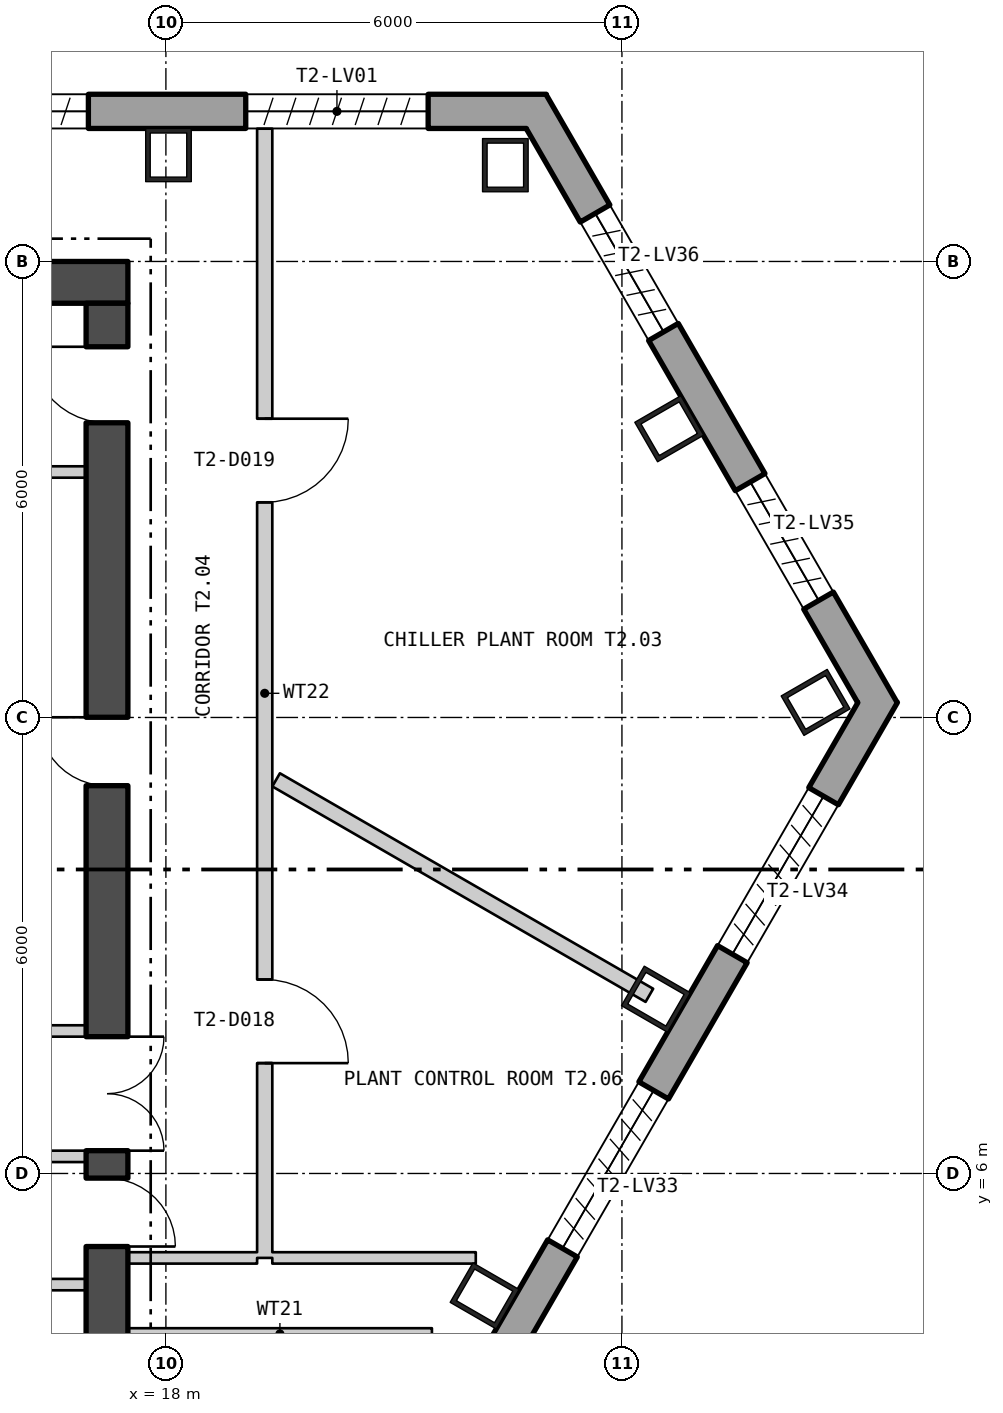
"""IFC4 building model, lengths in metres.
Left out: names, types, materials, properties, quantities, classifications, styles, units other than length and angle.
Written with IfcOpenShell. Run it as: python <this file> out.ifc"""

import sys

from ifc_helpers import new_model, si_unit, direction, frame, frame_2d, origin, origin_2d, place, context, subcontext, project, spatial, polyline, rectangle, hollow_rectangle, outline, extrude, element, fill, save


model = new_model("IFC4")
c1 = context("Model", 3, precision=1e-05, world=origin(), true_north=direction((0.0, 1.0)))
c2 = subcontext(c1, "Body", "Model", "MODEL_VIEW")
j1 = project(units=[si_unit("LENGTHUNIT", "METRE"), si_unit("PLANEANGLEUNIT", "RADIAN")], contexts=[c1])
p1 = place(None, origin())
s1 = spatial("IfcSite", under=j1, at=p1, CompositionType="ELEMENT")
p2 = place(p1, origin())
s2 = spatial("IfcBuilding", under=s1, at=p2, CompositionType="ELEMENT")
p3 = place(p2, frame((0.0, 0.0, 133.8)))
s3 = spatial("IfcBuildingStorey", under=s2, at=p3, CompositionType="ELEMENT", Elevation=133.8)
for number, where, z_axis, x_axis in (
    (1, (22.466, 19.267, 0.0), (0.0, 0.0, 1.0), (-1.0, 0.0, 0.0)),
    (2, (18.034, 19.4, 0.0), (0.0, 0.0, 1.0), (-1.0, 0.0, 0.0)),
    (3, (22.193, 4.389, 0.0), (0.0, 0.0, 1.0), (0.5, 0.866, 0.0)),
    (4, (24.447, 8.293, 0.0), (0.0, 0.0, 1.0), (0.5, 0.866, 0.0)),
    (5, (26.548, 12.198, 0.0), (0.0, 0.0, 1.0), (-0.5, 0.866, 0.0)),
    (6, (24.622, 15.799, 0.0), (0.0, 0.0, 1.0), (-0.5, 0.866, 0.0)),
):
    element("IfcColumn", number, at=place(p3, frame(where, z_axis=z_axis, x_axis=x_axis)), inside=s3, PredefinedType="COLUMN", context=c2, shape_type="SweptSolid", body=[
        extrude(hollow_rectangle(XDim=0.6, YDim=0.7, WallThickness=0.06, at=origin_2d()), origin(), (0.0, 0.0, 1.0), 6.0),
    ])
p4 = place(p3, frame((22.875, 19.975, -0.4), z_axis=(0.0, 0.0, 1.0), x_axis=(-1.0, 0.0, 0.0)))
e7 = element("IfcWall", 7, at=p4, inside=s3, PredefinedType="SOLIDWALL", context=c2, shape_type="SweptSolid", body=[
    extrude(outline(polyline([(-0.13, -0.225), (45.88, -0.225), (45.62, 0.225), (0.13, 0.225), (-0.13, -0.225)])), origin(), (0.0, 0.0, 1.0), 6.0),
])
p5 = place(p4, frame((1.425, 0.0, 1.6)))
e8 = element("IfcOpeningElement", 8, at=p5, cuts=e7, PredefinedType="OPENING", context=c2, shape_type="SweptSolid", body=[
    extrude(rectangle(XDim=2.4, YDim=3.6, at=frame_2d((1.2, 1.8))), frame((0.0, 0.235, 0.0), z_axis=(0.0, -1.0, 0.0), x_axis=(1.0, 0.0, 0.0)), (0.0, 0.0, 1.0), 0.47),
])
p6 = place(p4, frame((5.895, 0.0, 1.6)))
e9 = element("IfcOpeningElement", 9, at=p6, cuts=e7, PredefinedType="OPENING", context=c2, shape_type="SweptSolid", body=[
    extrude(rectangle(XDim=2.4, YDim=3.6, at=frame_2d((1.2, 1.8))), frame((0.0, 0.235, 0.0), z_axis=(0.0, -1.0, 0.0), x_axis=(1.0, 0.0, 0.0)), (0.0, 0.0, 1.0), 0.47),
])
p7 = place(p4, frame((10.403, 0.0, 1.6)))
e10 = element("IfcOpeningElement", 10, at=p7, cuts=e7, PredefinedType="OPENING", context=c2, shape_type="SweptSolid", body=[
    extrude(rectangle(XDim=2.4, YDim=3.6, at=frame_2d((1.2, 1.8))), frame((0.0, 0.235, 0.0), z_axis=(0.0, -1.0, 0.0), x_axis=(1.0, 0.0, 0.0)), (0.0, 0.0, 1.0), 0.47),
])
p8 = place(p4, frame((14.912, 0.0, 1.6)))
e11 = element("IfcOpeningElement", 11, at=p8, cuts=e7, PredefinedType="OPENING", context=c2, shape_type="SweptSolid", body=[
    extrude(rectangle(XDim=2.4, YDim=3.6, at=frame_2d((1.2, 1.8))), frame((0.0, 0.235, 0.0), z_axis=(0.0, -1.0, 0.0), x_axis=(1.0, 0.0, 0.0)), (0.0, 0.0, 1.0), 0.47),
])
p9 = place(p4, frame((19.421, 0.0, 1.6)))
e12 = element("IfcOpeningElement", 12, at=p9, cuts=e7, PredefinedType="OPENING", context=c2, shape_type="SweptSolid", body=[
    extrude(rectangle(XDim=2.4, YDim=3.6, at=frame_2d((1.2, 1.8))), frame((0.0, 0.235, 0.0), z_axis=(0.0, -1.0, 0.0), x_axis=(1.0, 0.0, 0.0)), (0.0, 0.0, 1.0), 0.47),
])
p10 = place(p4, frame((23.929, 0.0, 1.6)))
e13 = element("IfcOpeningElement", 13, at=p10, cuts=e7, PredefinedType="OPENING", context=c2, shape_type="SweptSolid", body=[
    extrude(rectangle(XDim=2.4, YDim=3.6, at=frame_2d((1.2, 1.8))), frame((0.0, 0.235, 0.0), z_axis=(0.0, -1.0, 0.0), x_axis=(1.0, 0.0, 0.0)), (0.0, 0.0, 1.0), 0.47),
])
p11 = place(p4, frame((28.438, 0.0, 1.6)))
e14 = element("IfcOpeningElement", 14, at=p11, cuts=e7, PredefinedType="OPENING", context=c2, shape_type="SweptSolid", body=[
    extrude(rectangle(XDim=2.4, YDim=3.6, at=frame_2d((1.2, 1.8))), frame((0.0, 0.235, 0.0), z_axis=(0.0, -1.0, 0.0), x_axis=(1.0, 0.0, 0.0)), (0.0, 0.0, 1.0), 0.47),
])
p12 = place(p4, frame((32.947, 0.0, 1.6)))
e15 = element("IfcOpeningElement", 15, at=p12, cuts=e7, PredefinedType="OPENING", context=c2, shape_type="SweptSolid", body=[
    extrude(rectangle(XDim=2.4, YDim=3.6, at=frame_2d((1.2, 1.8))), frame((0.0, 0.235, 0.0), z_axis=(0.0, -1.0, 0.0), x_axis=(1.0, 0.0, 0.0)), (0.0, 0.0, 1.0), 0.47),
])
p13 = place(p4, frame((37.455, 0.0, 1.6)))
e16 = element("IfcOpeningElement", 16, at=p13, cuts=e7, PredefinedType="OPENING", context=c2, shape_type="SweptSolid", body=[
    extrude(rectangle(XDim=2.4, YDim=3.6, at=frame_2d((1.2, 1.8))), frame((0.0, 0.235, 0.0), z_axis=(0.0, -1.0, 0.0), x_axis=(1.0, 0.0, 0.0)), (0.0, 0.0, 1.0), 0.47),
])
p14 = place(p4, frame((41.925, 0.0, 1.6)))
e17 = element("IfcOpeningElement", 17, at=p14, cuts=e7, PredefinedType="OPENING", context=c2, shape_type="SweptSolid", body=[
    extrude(rectangle(XDim=2.4, YDim=3.6, at=frame_2d((1.2, 1.8))), frame((0.0, 0.235, 0.0), z_axis=(0.0, -1.0, 0.0), x_axis=(1.0, 0.0, 0.0)), (0.0, 0.0, 1.0), 0.47),
])
p15 = place(p3, frame((4.49, -27.423, -0.18), z_axis=(0.0, 0.0, 1.0), x_axis=(0.500000335318, 0.866025210188, 0.0)))
e18 = element("IfcWall", 18, at=p15, inside=s3, PredefinedType="SOLIDWALL", context=c2, shape_type="SweptSolid", body=[
    extrude(outline(polyline([(-0.13, -0.225), (45.88, -0.225), (45.62, 0.225), (0.13, 0.225), (-0.13, -0.225)])), origin(), (0.0, 0.0, 1.0), 6.0),
])
p16 = place(p15, frame((1.425, 0.0, 1.38)))
e19 = element("IfcOpeningElement", 19, at=p16, cuts=e18, PredefinedType="OPENING", context=c2, shape_type="SweptSolid", body=[
    extrude(rectangle(XDim=2.4, YDim=3.6, at=frame_2d((1.2, 1.8))), frame((0.0, 0.235, 0.0), z_axis=(0.0, -1.0, 0.0), x_axis=(1.0, 0.0, 0.0)), (0.0, 0.0, 1.0), 0.47),
])
p17 = place(p15, frame((5.895, 0.0, 1.38)))
e20 = element("IfcOpeningElement", 20, at=p17, cuts=e18, PredefinedType="OPENING", context=c2, shape_type="SweptSolid", body=[
    extrude(rectangle(XDim=2.4, YDim=3.6, at=frame_2d((1.2, 1.8))), frame((0.0, 0.235, 0.0), z_axis=(0.0, -1.0, 0.0), x_axis=(1.0, 0.0, 0.0)), (0.0, 0.0, 1.0), 0.47),
])
p18 = place(p15, frame((10.403, 0.0, 1.38)))
e21 = element("IfcOpeningElement", 21, at=p18, cuts=e18, PredefinedType="OPENING", context=c2, shape_type="SweptSolid", body=[
    extrude(rectangle(XDim=2.4, YDim=3.6, at=frame_2d((1.2, 1.8))), frame((0.0, 0.235, 0.0), z_axis=(0.0, -1.0, 0.0), x_axis=(1.0, 0.0, 0.0)), (0.0, 0.0, 1.0), 0.47),
])
p19 = place(p15, frame((14.912, 0.0, 1.38)))
e22 = element("IfcOpeningElement", 22, at=p19, cuts=e18, PredefinedType="OPENING", context=c2, shape_type="SweptSolid", body=[
    extrude(rectangle(XDim=2.4, YDim=3.6, at=frame_2d((1.2, 1.8))), frame((0.0, 0.235, 0.0), z_axis=(0.0, -1.0, 0.0), x_axis=(1.0, 0.0, 0.0)), (0.0, 0.0, 1.0), 0.47),
])
p20 = place(p15, frame((19.421, 0.0, 1.38)))
e23 = element("IfcOpeningElement", 23, at=p20, cuts=e18, PredefinedType="OPENING", context=c2, shape_type="SweptSolid", body=[
    extrude(rectangle(XDim=2.4, YDim=3.6, at=frame_2d((1.2, 1.8))), frame((0.0, 0.235, 0.0), z_axis=(0.0, -1.0, 0.0), x_axis=(1.0, 0.0, 0.0)), (0.0, 0.0, 1.0), 0.47),
])
p21 = place(p15, frame((23.929, 0.0, 1.38)))
e24 = element("IfcOpeningElement", 24, at=p21, cuts=e18, PredefinedType="OPENING", context=c2, shape_type="SweptSolid", body=[
    extrude(rectangle(XDim=2.4, YDim=3.6, at=frame_2d((1.2, 1.8))), frame((0.0, 0.235, 0.0), z_axis=(0.0, -1.0, 0.0), x_axis=(1.0, 0.0, 0.0)), (0.0, 0.0, 1.0), 0.47),
])
p22 = place(p15, frame((28.438, 0.0, 1.38)))
e25 = element("IfcOpeningElement", 25, at=p22, cuts=e18, PredefinedType="OPENING", context=c2, shape_type="SweptSolid", body=[
    extrude(rectangle(XDim=2.4, YDim=3.6, at=frame_2d((1.2, 1.8))), frame((0.0, 0.235, 0.0), z_axis=(0.0, -1.0, 0.0), x_axis=(1.0, 0.0, 0.0)), (0.0, 0.0, 1.0), 0.47),
])
p23 = place(p15, frame((32.947, 0.0, 1.38)))
e26 = element("IfcOpeningElement", 26, at=p23, cuts=e18, PredefinedType="OPENING", context=c2, shape_type="SweptSolid", body=[
    extrude(rectangle(XDim=2.4, YDim=3.6, at=frame_2d((1.2, 1.8))), frame((0.0, 0.235, 0.0), z_axis=(0.0, -1.0, 0.0), x_axis=(1.0, 0.0, 0.0)), (0.0, 0.0, 1.0), 0.47),
])
p24 = place(p15, frame((37.455, 0.0, 1.38)))
e27 = element("IfcOpeningElement", 27, at=p24, cuts=e18, PredefinedType="OPENING", context=c2, shape_type="SweptSolid", body=[
    extrude(rectangle(XDim=2.4, YDim=3.6, at=frame_2d((1.2, 1.8))), frame((0.0, 0.235, 0.0), z_axis=(0.0, -1.0, 0.0), x_axis=(1.0, 0.0, 0.0)), (0.0, 0.0, 1.0), 0.47),
])
p25 = place(p15, frame((41.925, 0.0, 1.38)))
e28 = element("IfcOpeningElement", 28, at=p25, cuts=e18, PredefinedType="OPENING", context=c2, shape_type="SweptSolid", body=[
    extrude(rectangle(XDim=2.4, YDim=3.6, at=frame_2d((1.2, 1.8))), frame((0.0, 0.235, 0.0), z_axis=(0.0, -1.0, 0.0), x_axis=(1.0, 0.0, 0.0)), (0.0, 0.0, 1.0), 0.47),
])
p26 = place(p3, frame((27.361, 12.196, -0.4), z_axis=(0.0, 0.0, 1.0), x_axis=(-0.500003921696, 0.86602313958, 0.0)))
e29 = element("IfcWall", 29, at=p26, inside=s3, PredefinedType="SOLIDWALL", context=c2, shape_type="SweptSolid", body=[
    extrude(outline(polyline([(-0.13, -0.225), (9.11, -0.225), (8.85, 0.225), (0.13, 0.225), (-0.13, -0.225)])), origin(), (0.0, 0.0, 1.0), 6.0),
])
p27 = place(p26, frame((1.549, 0.0, 1.6)))
e30 = element("IfcOpeningElement", 30, at=p27, cuts=e29, PredefinedType="OPENING", context=c2, shape_type="SweptSolid", body=[
    extrude(rectangle(XDim=1.8, YDim=3.6, at=frame_2d((0.9, 1.8))), frame((0.0, 0.235, 0.0), z_axis=(0.0, -1.0, 0.0), x_axis=(1.0, 0.0, 0.0)), (0.0, 0.0, 1.0), 0.47),
])
p28 = place(p26, frame((5.631, 0.0, 1.6)))
e31 = element("IfcOpeningElement", 31, at=p28, cuts=e29, PredefinedType="OPENING", context=c2, shape_type="SweptSolid", body=[
    extrude(rectangle(XDim=1.8, YDim=3.6, at=frame_2d((0.9, 1.8))), frame((0.0, 0.235, 0.0), z_axis=(0.0, -1.0, 0.0), x_axis=(1.0, 0.0, 0.0)), (0.0, 0.0, 1.0), 0.47),
])
p29 = place(p3, frame((-17.5, 17.725, 0.0), z_axis=(0.0, 0.0, 1.0), x_axis=(1.0, 0.0, 0.0)))
e32 = element("IfcWall", 32, at=p29, inside=s3, PredefinedType="SHEAR", context=c2, shape_type="SweptSolid", body=[
    extrude(rectangle(XDim=35.0, YDim=0.55, at=frame_2d((17.5, 0.0))), origin(), (0.0, 0.0, 1.0), 5.8),
])
p30 = place(p3, frame((17.225, 0.55, 0.0), z_axis=(0.0, 0.0, 1.0), x_axis=(0.0, 1.0, 0.0)))
e33 = element("IfcWall", 33, at=p30, inside=s3, PredefinedType="SHEAR", context=c2, shape_type="SweptSolid", body=[
    extrude(rectangle(XDim=16.9, YDim=0.55, at=frame_2d((8.45, 0.0))), origin(), (0.0, 0.0, 1.0), 5.8),
])
p31 = place(p30, frame((5.75, 0.0, 0.0)))
e34 = element("IfcOpeningElement", 34, at=p31, cuts=e33, PredefinedType="OPENING", context=c2, shape_type="SweptSolid", body=[
    extrude(rectangle(XDim=1.5, YDim=2.1, at=frame_2d((0.75, 1.05))), frame((0.0, 0.285, 0.0), z_axis=(0.0, -1.0, 0.0), x_axis=(1.0, 0.0, 0.0)), (0.0, 0.0, 1.0), 0.57),
])
p32 = place(p30, frame((1.506, 0.0, 0.0)))
e35 = element("IfcOpeningElement", 35, at=p32, cuts=e33, PredefinedType="OPENING", context=c2, shape_type="SweptSolid", body=[
    extrude(rectangle(XDim=0.9, YDim=2.1, at=frame_2d((0.45, 1.05))), frame((0.0, 0.285, 0.0), z_axis=(0.0, -1.0, 0.0), x_axis=(1.0, 0.0, 0.0)), (0.0, 0.0, 1.0), 0.57),
])
p33 = place(p30, frame((4.489, 0.0, 0.0)))
e36 = element("IfcOpeningElement", 36, at=p33, cuts=e33, PredefinedType="OPENING", context=c2, shape_type="SweptSolid", body=[
    extrude(rectangle(XDim=0.9, YDim=2.1, at=frame_2d((0.45, 1.05))), frame((0.0, 0.285, 0.0), z_axis=(0.0, -1.0, 0.0), x_axis=(1.0, 0.0, 0.0)), (0.0, 0.0, 1.0), 0.57),
])
p34 = place(p30, frame((10.553, 0.0, 0.0)))
e37 = element("IfcOpeningElement", 37, at=p34, cuts=e33, PredefinedType="OPENING", context=c2, shape_type="SweptSolid", body=[
    extrude(rectangle(XDim=0.9, YDim=2.1, at=frame_2d((0.45, 1.05))), frame((0.0, 0.285, 0.0), z_axis=(0.0, -1.0, 0.0), x_axis=(1.0, 0.0, 0.0)), (0.0, 0.0, 1.0), 0.57),
])
p35 = place(p30, frame((15.328, 0.0, 0.0)))
e38 = element("IfcOpeningElement", 38, at=p35, cuts=e33, PredefinedType="OPENING", context=c2, shape_type="SweptSolid", body=[
    extrude(rectangle(XDim=1.0, YDim=2.1, at=frame_2d((0.5, 1.05))), frame((0.0, 0.285, 0.0), z_axis=(0.0, -1.0, 0.0), x_axis=(1.0, 0.0, 0.0)), (0.0, 0.0, 1.0), 0.57),
])
p36 = place(p3, frame((14.5, 6.225, 0.0), z_axis=(0.0, 0.0, 1.0), x_axis=(1.0, 0.0, 0.0)))
e39 = element("IfcWall", 39, at=p36, inside=s3, PredefinedType="PARTITIONING", context=c2, shape_type="SweptSolid", body=[
    extrude(rectangle(XDim=2.45, YDim=0.15, at=frame_2d((1.225, 0.0))), origin(), (0.0, 0.0, 1.0), 5.8),
])
p37 = place(p3, frame((14.5, 7.875, 0.0), z_axis=(0.0, 0.0, 1.0), x_axis=(1.0, 0.0, 0.0)))
e40 = element("IfcWall", 40, at=p37, inside=s3, PredefinedType="PARTITIONING", context=c2, shape_type="SweptSolid", body=[
    extrude(rectangle(XDim=2.45, YDim=0.15, at=frame_2d((1.225, 0.0))), origin(), (0.0, 0.0, 1.0), 5.5),
])
for number, where, z_axis, x_axis in (
    (41, (14.5, 4.538, 0.0), (0.0, 0.0, 1.0), (1.0, 0.0, 0.0)),
    (42, (14.5, 15.23, 0.0), (0.0, 0.0, 1.0), (1.0, 0.0, 0.0)),
):
    element("IfcWall", number, at=place(p3, frame(where, z_axis=z_axis, x_axis=x_axis)), inside=s3, PredefinedType="PARTITIONING", context=c2, shape_type="SweptSolid", body=[
        extrude(rectangle(XDim=2.45, YDim=0.15, at=frame_2d((1.225, 0.0))), origin(), (0.0, 0.0, 1.0), 5.8),
    ])
p38 = place(p3, frame((17.5, 3.889, 0.0), z_axis=(0.0, 0.0, 1.0), x_axis=(1.0, 0.0, 0.0)))
e43 = element("IfcWall", 43, at=p38, inside=s3, PredefinedType="PARTITIONING", context=c2, shape_type="SweptSolid", body=[
    extrude(rectangle(XDim=4.0, YDim=0.15, at=frame_2d((2.0, 0.0))), origin(), (0.0, 0.0, 1.0), 5.8),
])
p39 = place(p3, frame((17.5, 4.889, 0.0), z_axis=(0.0, 0.0, 1.0), x_axis=(1.0, 0.0, 0.0)))
e44 = element("IfcWall", 44, at=p39, inside=s3, PredefinedType="PARTITIONING", context=c2, shape_type="SweptSolid", body=[
    extrude(rectangle(XDim=1.7, YDim=0.15, at=frame_2d((0.85, 0.0))), origin(), (0.0, 0.0, 1.0), 5.8),
])
p40 = place(p3, frame((19.3, 4.889, 0.0), z_axis=(0.0, 0.0, 1.0), x_axis=(0.0, 1.0, 0.0)))
e45 = element("IfcWall", 45, at=p40, inside=s3, PredefinedType="PARTITIONING", context=c2, shape_type="SweptSolid", body=[
    extrude(rectangle(XDim=14.858, YDim=0.2, at=frame_2d((7.429, 0.0))), origin(), (0.0, 0.0, 1.0), 5.8),
])
p41 = place(p40, frame((2.563, 0.0, 0.0)))
e46 = element("IfcOpeningElement", 46, at=p41, cuts=e45, PredefinedType="OPENING", context=c2, shape_type="SweptSolid", body=[
    extrude(rectangle(XDim=1.1, YDim=2.1, at=frame_2d((0.55, 1.05))), frame((0.0, 0.11, 0.0), z_axis=(0.0, -1.0, 0.0), x_axis=(1.0, 0.0, 0.0)), (0.0, 0.0, 1.0), 0.22),
])
p42 = place(p40, frame((9.942, 0.0, 0.0)))
e47 = element("IfcOpeningElement", 47, at=p42, cuts=e45, PredefinedType="OPENING", context=c2, shape_type="SweptSolid", body=[
    extrude(rectangle(XDim=1.1, YDim=2.1, at=frame_2d((0.55, 1.05))), frame((0.0, 0.11, 0.0), z_axis=(0.0, -1.0, 0.0), x_axis=(1.0, 0.0, 0.0)), (0.0, 0.0, 1.0), 0.22),
])
p43 = place(p3, frame((19.4, 4.889, 0.0), z_axis=(0.0, 0.0, 1.0), x_axis=(1.0, 0.0, 0.0)))
e48 = element("IfcWall", 48, at=p43, inside=s3, PredefinedType="PARTITIONING", context=c2, shape_type="SweptSolid", body=[
    extrude(rectangle(XDim=2.677, YDim=0.15, at=frame_2d((1.339, 0.0))), origin(), (0.0, 0.0, 1.0), 5.8),
])
p44 = place(p3, frame((19.45, 11.179, 0.0), z_axis=(0.0, 0.0, 1.0), x_axis=(0.866053440288, -0.499951436208, 0.0)))
e49 = element("IfcWall", 49, at=p44, inside=s3, PredefinedType="PARTITIONING", context=c2, shape_type="SweptSolid", body=[
    extrude(rectangle(XDim=5.671, YDim=0.2, at=frame_2d((2.835, 0.0))), origin(), (0.0, 0.0, 1.0), 5.8),
])
p45 = place(p31, origin())
e50 = element("IfcDoor", 50, at=p45, inside=s3, OperationType="DOUBLE_DOOR_SINGLE_SWING", PredefinedType="DOOR", context=c2, shape_type="SweptSolid", body=[
    extrude(rectangle(XDim=1.5, YDim=2.1, at=frame_2d((0.75, 1.05))), frame((0.0, 0.025, 0.0), z_axis=(0.0, -1.0, 0.0), x_axis=(1.0, 0.0, 0.0)), (0.0, 0.0, 1.0), 0.05),
])
fill(e34, e50)
p46 = place(p33, origin())
e51 = element("IfcDoor", 51, at=p46, inside=s3, OperationType="SINGLE_SWING_LEFT", PredefinedType="DOOR", context=c2, shape_type="SweptSolid", body=[
    extrude(rectangle(XDim=0.9, YDim=2.1, at=frame_2d((0.45, 1.05))), frame((0.0, 0.025, 0.0), z_axis=(0.0, -1.0, 0.0), x_axis=(1.0, 0.0, 0.0)), (0.0, 0.0, 1.0), 0.05),
])
fill(e36, e51)
p47 = place(p34, origin())
e52 = element("IfcDoor", 52, at=p47, inside=s3, OperationType="SINGLE_SWING_LEFT", PredefinedType="DOOR", context=c2, shape_type="SweptSolid", body=[
    extrude(rectangle(XDim=0.9, YDim=2.1, at=frame_2d((0.45, 1.05))), frame((0.0, 0.025, 0.0), z_axis=(0.0, -1.0, 0.0), x_axis=(1.0, 0.0, 0.0)), (0.0, 0.0, 1.0), 0.05),
])
fill(e37, e52)
p48 = place(p35, origin())
e53 = element("IfcDoor", 53, at=p48, inside=s3, OperationType="SINGLE_SWING_LEFT", PredefinedType="DOOR", context=c2, shape_type="SweptSolid", body=[
    extrude(rectangle(XDim=1.0, YDim=2.1, at=frame_2d((0.5, 1.05))), frame((0.0, 0.025, 0.0), z_axis=(0.0, -1.0, 0.0), x_axis=(1.0, 0.0, 0.0)), (0.0, 0.0, 1.0), 0.05),
])
fill(e38, e53)
p49 = place(p41, origin())
e54 = element("IfcDoor", 54, at=p49, inside=s3, OperationType="SINGLE_SWING_LEFT", PredefinedType="DOOR", context=c2, shape_type="SweptSolid", body=[
    extrude(rectangle(XDim=1.1, YDim=2.1, at=frame_2d((0.55, 1.05))), frame((0.0, 0.025, 0.0), z_axis=(0.0, -1.0, 0.0), x_axis=(1.0, 0.0, 0.0)), (0.0, 0.0, 1.0), 0.05),
])
fill(e46, e54)
p50 = place(p42, origin())
e55 = element("IfcDoor", 55, at=p50, inside=s3, OperationType="SINGLE_SWING_RIGHT", PredefinedType="DOOR", context=c2, shape_type="SweptSolid", body=[
    extrude(rectangle(XDim=1.1, YDim=2.1, at=frame_2d((0.55, 1.05))), frame((0.0, 0.025, 0.0), z_axis=(0.0, -1.0, 0.0), x_axis=(1.0, 0.0, 0.0)), (0.0, 0.0, 1.0), 0.05),
])
fill(e47, e55)
save(model, sys.argv[1])
